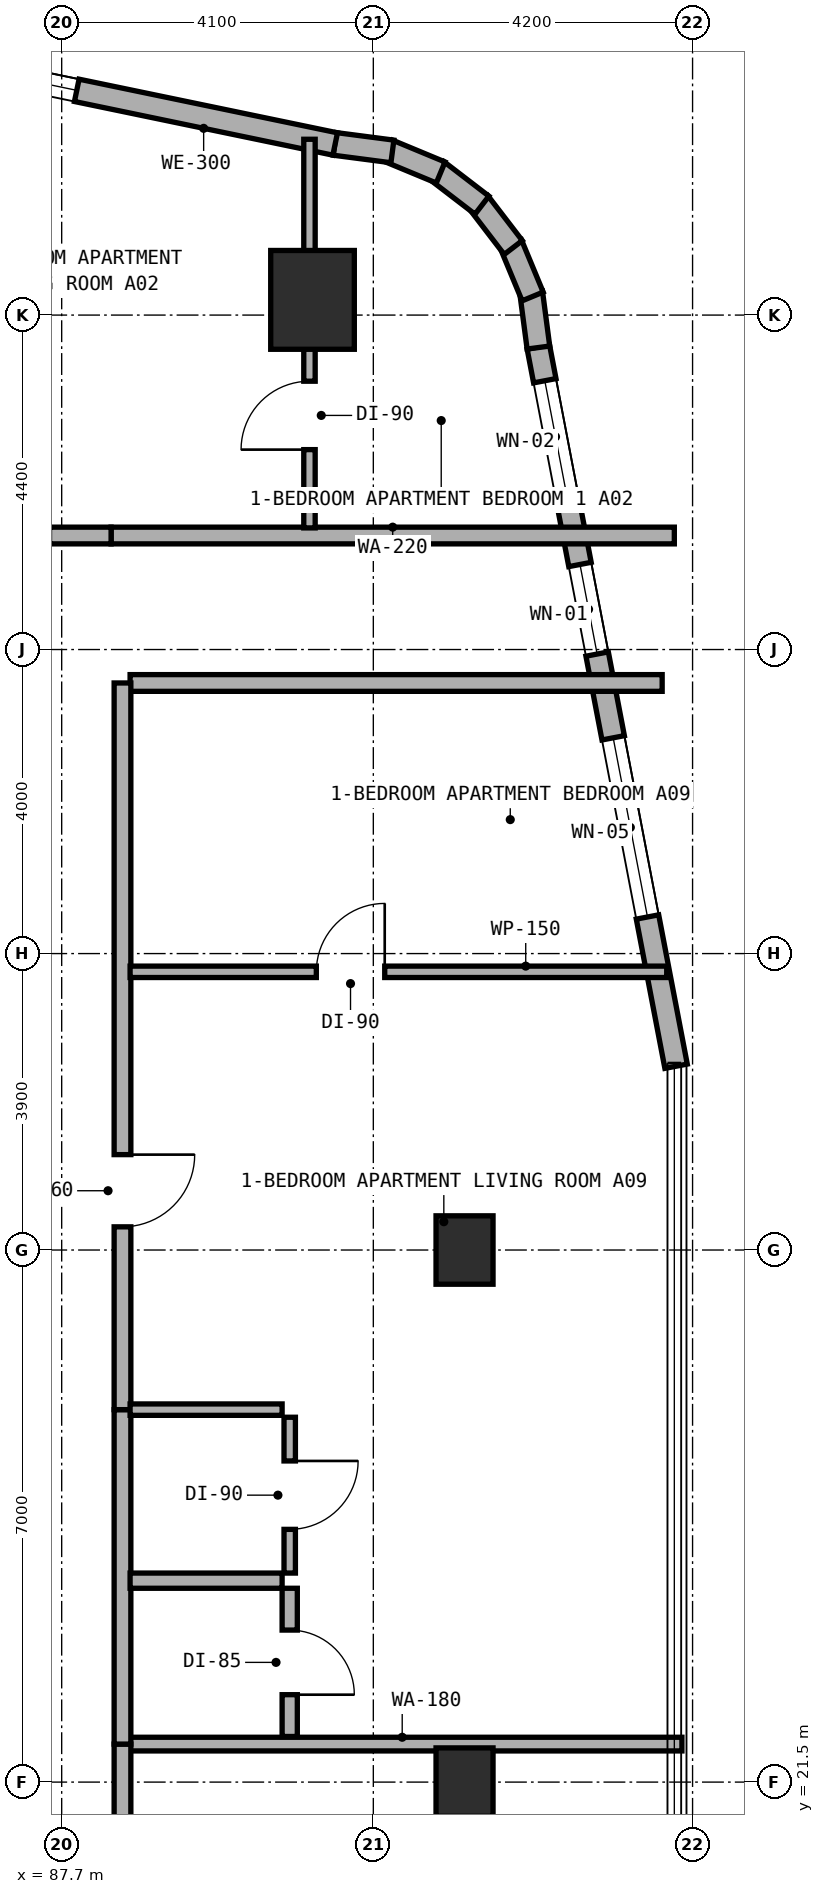
"""IFC4 building model, lengths in metres.
Left out: names, types, materials, properties, quantities, classifications, styles, units other than length and angle.
Written with IfcOpenShell. Run it as: python <this file> out.ifc"""

import sys

from ifc_helpers import new_model, si_unit, direction, frame, frame_2d, origin, origin_2d, place, context, subcontext, project, spatial, rectangle, extrude, element, fill, save


model = new_model("IFC4")
c1 = context("Model", 3, precision=1e-05, world=origin(), true_north=direction((0.0, 1.0)))
c2 = subcontext(c1, "Body", "Model", "MODEL_VIEW")
j1 = project(units=[si_unit("LENGTHUNIT", "METRE"), si_unit("PLANEANGLEUNIT", "RADIAN")], contexts=[c1])
p1 = place(None, origin())
s1 = spatial("IfcSite", under=j1, at=p1, CompositionType="ELEMENT")
p2 = place(p1, origin())
s2 = spatial("IfcBuilding", under=s1, at=p2, CompositionType="ELEMENT")
p3 = place(p2, frame((0.0, 0.0, 41.5)))
s3 = spatial("IfcBuildingStorey", under=s2, at=p3, CompositionType="ELEMENT", Elevation=41.5)
for number, where, z_axis, x_axis in (
    (1, (93.0, 21.5, 0.0), (0.0, 0.0, 1.0), (1.0, 0.0, 0.0)),
    (2, (93.0, 28.5, 0.0), (0.0, 0.0, 1.0), (1.0, 0.0, 0.0)),
):
    element("IfcColumn", number, at=place(p3, frame(where, z_axis=z_axis, x_axis=x_axis)), inside=s3, PredefinedType="COLUMN", context=c2, shape_type="SweptSolid", body=[
        extrude(rectangle(XDim=0.75, YDim=0.9, at=origin_2d()), origin(), (0.0, 0.0, 1.0), 3.5),
    ])
p4 = place(p3, frame((91.0, 41.0, 0.0), z_axis=(0.0, 0.0, 1.0), x_axis=(1.0, 0.0, 0.0)))
e3 = element("IfcColumn", 3, at=p4, inside=s3, PredefinedType="COLUMN", context=c2, shape_type="SweptSolid", body=[
    extrude(rectangle(XDim=1.1, YDim=1.3, at=origin_2d()), origin(), (0.0, 0.0, 1.0), 3.5),
])
p5 = place(p3, frame((95.783, 30.918, 0.0), z_axis=(0.0, 0.0, 1.0), x_axis=(-0.188087874316, 0.982152203854, 0.0)))
e4 = element("IfcWall", 4, at=p5, inside=s3, PredefinedType="STANDARD", context=c2, shape_type="SweptSolid", body=[
    extrude(rectangle(XDim=9.634, YDim=0.3, at=frame_2d((4.817, 0.0))), origin(), (0.0, 0.0, 1.0), 3.25),
])
p6 = place(p5, frame((1.999, 0.0, 0.8)))
e5 = element("IfcOpeningElement", 5, at=p6, cuts=e4, PredefinedType="OPENING", context=c2, shape_type="SweptSolid", body=[
    extrude(rectangle(XDim=2.4, YDim=1.6, at=frame_2d((1.2, 0.8))), frame((0.0, 0.16, 0.0), z_axis=(0.0, -1.0, 0.0), x_axis=(1.0, 0.0, 0.0)), (0.0, 0.0, 1.0), 0.32),
])
p7 = place(p5, frame((5.521, 0.0, 0.85)))
e6 = element("IfcOpeningElement", 6, at=p7, cuts=e4, PredefinedType="OPENING", context=c2, shape_type="SweptSolid", body=[
    extrude(rectangle(XDim=1.2, YDim=1.5, at=frame_2d((0.6, 0.75))), frame((0.0, 0.16, 0.0), z_axis=(0.0, -1.0, 0.0), x_axis=(1.0, 0.0, 0.0)), (0.0, 0.0, 1.0), 0.32),
])
p8 = place(p5, frame((7.682, 0.0, 0.85)))
e7 = element("IfcOpeningElement", 7, at=p8, cuts=e4, PredefinedType="OPENING", context=c2, shape_type="SweptSolid", body=[
    extrude(rectangle(XDim=1.5, YDim=1.5, at=frame_2d((0.75, 0.75))), frame((0.0, 0.16, 0.0), z_axis=(0.0, -1.0, 0.0), x_axis=(1.0, 0.0, 0.0)), (0.0, 0.0, 1.0), 0.32),
])
p9 = place(p3, frame((93.972, 40.373, 0.0), z_axis=(0.0, 0.0, 1.0), x_axis=(-0.130255288807, 0.991480488834, 0.0)))
e8 = element("IfcWall", 8, at=p9, inside=s3, PredefinedType="STANDARD", context=c2, shape_type="SweptSolid", body=[
    extrude(rectangle(XDim=0.729, YDim=0.3, at=frame_2d((0.365, 0.0))), origin(), (0.0, 0.0, 1.0), 3.25),
])
p10 = place(p3, frame((93.896, 41.045, 0.0), z_axis=(0.0, 0.0, 1.0), x_axis=(-0.383267045233, 0.923637576129, 0.0)))
e9 = element("IfcWall", 9, at=p10, inside=s3, PredefinedType="STANDARD", context=c2, shape_type="SweptSolid", body=[
    extrude(rectangle(XDim=0.746, YDim=0.3, at=frame_2d((0.373, 0.0))), origin(), (0.0, 0.0, 1.0), 3.25),
])
for number, where, z_axis, x_axis in (
    (10, (93.641, 41.689, 0.0), (0.0, 0.0, 1.0), (-0.609, 0.793, 0.0)),
    (11, (93.229, 42.246, 0.0), (0.0, 0.0, 1.0), (-0.794, 0.608, 0.0)),
):
    element("IfcWall", number, at=place(p3, frame(where, z_axis=z_axis, x_axis=x_axis)), inside=s3, PredefinedType="STANDARD", context=c2, shape_type="SweptSolid", body=[
        extrude(rectangle(XDim=0.746, YDim=0.3, at=frame_2d((0.373, 0.0))), origin(), (0.0, 0.0, 1.0), 3.25),
    ])
p11 = place(p3, frame((92.686, 42.676, 0.0), z_axis=(0.0, 0.0, 1.0), x_axis=(-0.923637576129, 0.383267045233, 0.0)))
e12 = element("IfcWall", 12, at=p11, inside=s3, PredefinedType="STANDARD", context=c2, shape_type="SweptSolid", body=[
    extrude(rectangle(XDim=0.746, YDim=0.3, at=frame_2d((0.373, 0.0))), origin(), (0.0, 0.0, 1.0), 3.25),
])
p12 = place(p3, frame((92.051, 42.953, 0.0), z_axis=(0.0, 0.0, 1.0), x_axis=(-0.991559404866, 0.129653178221, 0.0)))
e13 = element("IfcWall", 13, at=p12, inside=s3, PredefinedType="STANDARD", context=c2, shape_type="SweptSolid", body=[
    extrude(rectangle(XDim=0.764, YDim=0.3, at=frame_2d((0.382, 0.0))), origin(), (0.0, 0.0, 1.0), 3.25),
])
p13 = place(p3, frame((91.298, 43.051, 0.0), z_axis=(0.0, 0.0, 1.0), x_axis=(-0.979128391325, 0.203242695569, 0.0)))
e14 = element("IfcWall", 14, at=p13, inside=s3, PredefinedType="STANDARD", context=c2, shape_type="SweptSolid", body=[
    extrude(rectangle(XDim=8.92, YDim=0.3, at=frame_2d((4.46, 0.0))), origin(), (0.0, 0.0, 1.0), 3.25),
])
p14 = place(p13, frame((3.472, 0.0, 0.8)))
e15 = element("IfcOpeningElement", 15, at=p14, cuts=e14, PredefinedType="OPENING", context=c2, shape_type="SweptSolid", body=[
    extrude(rectangle(XDim=2.4, YDim=1.6, at=frame_2d((1.2, 0.8))), frame((0.0, 0.16, 0.0), z_axis=(0.0, -1.0, 0.0), x_axis=(1.0, 0.0, 0.0)), (0.0, 0.0, 1.0), 0.32),
])
p15 = place(p3, frame((88.35, 37.9, 0.0), z_axis=(0.0, 0.0, 1.0), x_axis=(1.0, 0.0, 0.0)))
e16 = element("IfcWall", 16, at=p15, inside=s3, PredefinedType="SOLIDWALL", context=c2, shape_type="SweptSolid", body=[
    extrude(rectangle(XDim=7.41, YDim=0.22, at=frame_2d((3.705, 0.0))), origin(), (0.0, 0.0, 1.0), 2.865),
])
p16 = place(p3, frame((85.78, 37.9, 0.0), z_axis=(0.0, 0.0, 1.0), x_axis=(1.0, 0.0, 0.0)))
e17 = element("IfcWall", 17, at=p16, inside=s3, PredefinedType="SOLIDWALL", context=c2, shape_type="SweptSolid", body=[
    extrude(rectangle(XDim=2.57, YDim=0.22, at=frame_2d((1.285, 0.0))), origin(), (0.0, 0.0, 1.0), 3.22),
])
p17 = place(p16, frame((0.81, 0.0, 0.0)))
e18 = element("IfcOpeningElement", 18, at=p17, cuts=e17, PredefinedType="OPENING", context=c2, shape_type="SweptSolid", body=[
    extrude(rectangle(XDim=0.95, YDim=2.1, at=frame_2d((0.475, 1.05))), frame((0.0, 0.12, 0.0), z_axis=(0.0, -1.0, 0.0), x_axis=(1.0, 0.0, 0.0)), (0.0, 0.0, 1.0), 0.24),
])
p18 = place(p3, frame((90.96, 38.0, 0.0), z_axis=(0.0, 0.0, 1.0), x_axis=(0.0, 1.0, 0.0)))
e19 = element("IfcWall", 19, at=p18, inside=s3, PredefinedType="PARTITIONING", context=c2, shape_type="SweptSolid", body=[
    extrude(rectangle(XDim=5.113, YDim=0.15, at=frame_2d((2.557, 0.0))), origin(), (0.0, 0.0, 1.0), 2.865),
])
p19 = place(p18, frame((1.03, 0.0, 0.0)))
e20 = element("IfcOpeningElement", 20, at=p19, cuts=e19, PredefinedType="OPENING", context=c2, shape_type="SweptSolid", body=[
    extrude(rectangle(XDim=0.9, YDim=2.1, at=frame_2d((0.45, 1.05))), frame((0.0, 0.085, 0.0), z_axis=(0.0, -1.0, 0.0), x_axis=(1.0, 0.0, 0.0)), (0.0, 0.0, 1.0), 0.17),
])
p20 = place(p3, frame((88.6, 35.96, 0.0), z_axis=(0.0, 0.0, 1.0), x_axis=(1.0, 0.0, 0.0)))
e21 = element("IfcWall", 21, at=p20, inside=s3, PredefinedType="SOLIDWALL", context=c2, shape_type="SweptSolid", body=[
    extrude(rectangle(XDim=7.0, YDim=0.22, at=frame_2d((3.5, 0.0))), origin(), (0.0, 0.0, 1.0), 2.865),
])
p21 = place(p3, frame((88.5, 22.0, 0.0), z_axis=(0.0, 0.0, 1.0), x_axis=(1.0, 0.0, 0.0)))
e22 = element("IfcWall", 22, at=p21, inside=s3, PredefinedType="SOLIDWALL", context=c2, shape_type="SweptSolid", body=[
    extrude(rectangle(XDim=7.36, YDim=0.18, at=frame_2d((3.68, 0.0))), origin(), (0.0, 0.0, 1.0), 2.865),
])
p22 = place(p3, frame((88.5, 18.44, 0.0), z_axis=(0.0, 0.0, 1.0), x_axis=(0.0, 1.0, 0.0)))
e23 = element("IfcWall", 23, at=p22, inside=s3, PredefinedType="SOLIDWALL", context=c2, shape_type="SweptSolid", body=[
    extrude(rectangle(XDim=3.56, YDim=0.22, at=frame_2d((1.78, 0.0))), origin(), (0.0, 0.0, 1.0), 2.725),
])
p23 = place(p22, frame((1.305, 0.0, 0.0)))
e24 = element("IfcOpeningElement", 24, at=p23, cuts=e23, PredefinedType="OPENING", context=c2, shape_type="SweptSolid", body=[
    extrude(rectangle(XDim=0.95, YDim=2.1, at=frame_2d((0.475, 1.05))), frame((0.0, 0.12, 0.0), z_axis=(0.0, -1.0, 0.0), x_axis=(1.0, 0.0, 0.0)), (0.0, 0.0, 1.0), 0.24),
])
p24 = place(p3, frame((88.5, 22.0, 0.0), z_axis=(0.0, 0.0, 1.0), x_axis=(0.0, 1.0, 0.0)))
e25 = element("IfcWall", 25, at=p24, inside=s3, PredefinedType="SOLIDWALL", context=c2, shape_type="SweptSolid", body=[
    extrude(rectangle(XDim=4.4, YDim=0.22, at=frame_2d((2.2, 0.0))), origin(), (0.0, 0.0, 1.0), 3.22),
])
p25 = place(p3, frame((88.5, 26.4, 0.0), z_axis=(0.0, 0.0, 1.0), x_axis=(0.0, 1.0, 0.0)))
e26 = element("IfcWall", 26, at=p25, inside=s3, PredefinedType="SOLIDWALL", context=c2, shape_type="SweptSolid", body=[
    extrude(rectangle(XDim=9.56, YDim=0.22, at=frame_2d((4.78, 0.0))), origin(), (0.0, 0.0, 1.0), 2.725),
])
p26 = place(p25, frame((2.405, 0.0, 0.0)))
e27 = element("IfcOpeningElement", 27, at=p26, cuts=e26, PredefinedType="OPENING", context=c2, shape_type="SweptSolid", body=[
    extrude(rectangle(XDim=0.95, YDim=2.1, at=frame_2d((0.475, 1.05))), frame((0.0, 0.12, 0.0), z_axis=(0.0, -1.0, 0.0), x_axis=(1.0, 0.0, 0.0)), (0.0, 0.0, 1.0), 0.24),
])
p27 = place(p3, frame((88.6, 32.16, 0.0), z_axis=(0.0, 0.0, 1.0), x_axis=(1.0, 0.0, 0.0)))
e28 = element("IfcWall", 28, at=p27, inside=s3, PredefinedType="PARTITIONING", context=c2, shape_type="SweptSolid", body=[
    extrude(rectangle(XDim=7.06, YDim=0.15, at=frame_2d((3.53, 0.0))), origin(), (0.0, 0.0, 1.0), 2.865),
])
p28 = place(p27, frame((2.45, 0.0, 0.0)))
e29 = element("IfcOpeningElement", 29, at=p28, cuts=e28, PredefinedType="OPENING", context=c2, shape_type="SweptSolid", body=[
    extrude(rectangle(XDim=0.9, YDim=2.1, at=frame_2d((0.45, 1.05))), frame((0.0, 0.085, 0.0), z_axis=(0.0, -1.0, 0.0), x_axis=(1.0, 0.0, 0.0)), (0.0, 0.0, 1.0), 0.17),
])
p29 = place(p3, frame((88.6, 24.15, 0.0), z_axis=(0.0, 0.0, 1.0), x_axis=(1.0, 0.0, 0.0)))
e30 = element("IfcWall", 30, at=p29, inside=s3, PredefinedType="PLUMBINGWALL", context=c2, shape_type="SweptSolid", body=[
    extrude(rectangle(XDim=2.0, YDim=0.2, at=frame_2d((1.0, 0.0))), origin(), (0.0, 0.0, 1.0), 3.22),
])
p30 = place(p3, frame((88.6, 26.4, 0.0), z_axis=(0.0, 0.0, 1.0), x_axis=(1.0, 0.0, 0.0)))
e31 = element("IfcWall", 31, at=p30, inside=s3, PredefinedType="PARTITIONING", context=c2, shape_type="SweptSolid", body=[
    extrude(rectangle(XDim=2.0, YDim=0.15, at=frame_2d((1.0, 0.0))), origin(), (0.0, 0.0, 1.0), 3.22),
])
p31 = place(p3, frame((90.7, 22.1, 0.0), z_axis=(0.0, 0.0, 1.0), x_axis=(0.0, 1.0, 0.0)))
e32 = element("IfcWall", 32, at=p31, inside=s3, PredefinedType="PLUMBINGWALL", context=c2, shape_type="SweptSolid", body=[
    extrude(rectangle(XDim=1.95, YDim=0.2, at=frame_2d((0.975, 0.0))), origin(), (0.0, 0.0, 1.0), 3.22),
])
p32 = place(p31, frame((0.55, 0.0, 0.0)))
e33 = element("IfcOpeningElement", 33, at=p32, cuts=e32, PredefinedType="OPENING", context=c2, shape_type="SweptSolid", body=[
    extrude(rectangle(XDim=0.85, YDim=2.1, at=frame_2d((0.425, 1.05))), frame((0.0, 0.11, 0.0), z_axis=(0.0, -1.0, 0.0), x_axis=(1.0, 0.0, 0.0)), (0.0, 0.0, 1.0), 0.22),
])
p33 = place(p3, frame((90.7, 24.25, 0.0), z_axis=(0.0, 0.0, 1.0), x_axis=(0.0, 1.0, 0.0)))
e34 = element("IfcWall", 34, at=p33, inside=s3, PredefinedType="PARTITIONING", context=c2, shape_type="SweptSolid", body=[
    extrude(rectangle(XDim=2.05, YDim=0.15, at=frame_2d((1.025, 0.0))), origin(), (0.0, 0.0, 1.0), 3.22),
])
p34 = place(p33, frame((0.575, 0.0, 0.0)))
e35 = element("IfcOpeningElement", 35, at=p34, cuts=e34, PredefinedType="OPENING", context=c2, shape_type="SweptSolid", body=[
    extrude(rectangle(XDim=0.9, YDim=2.1, at=frame_2d((0.45, 1.05))), frame((0.0, 0.085, 0.0), z_axis=(0.0, -1.0, 0.0), x_axis=(1.0, 0.0, 0.0)), (0.0, 0.0, 1.0), 0.17),
])
p35 = place(p6, origin())
e36 = element("IfcWindow", 36, at=p35, inside=s3, PartitioningType="SINGLE_PANEL", PredefinedType="WINDOW", context=c2, shape_type="SweptSolid", body=[
    extrude(rectangle(XDim=2.4, YDim=1.6, at=frame_2d((1.2, 0.8))), frame((0.0, 0.03, 0.0), z_axis=(0.0, -1.0, 0.0), x_axis=(1.0, 0.0, 0.0)), (0.0, 0.0, 1.0), 0.06),
])
fill(e5, e36)
p36 = place(p7, origin())
e37 = element("IfcWindow", 37, at=p36, inside=s3, PartitioningType="SINGLE_PANEL", PredefinedType="WINDOW", context=c2, shape_type="SweptSolid", body=[
    extrude(rectangle(XDim=1.2, YDim=1.5, at=frame_2d((0.6, 0.75))), frame((0.0, 0.03, 0.0), z_axis=(0.0, -1.0, 0.0), x_axis=(1.0, 0.0, 0.0)), (0.0, 0.0, 1.0), 0.06),
])
fill(e6, e37)
p37 = place(p8, origin())
e38 = element("IfcWindow", 38, at=p37, inside=s3, PartitioningType="SINGLE_PANEL", PredefinedType="WINDOW", context=c2, shape_type="SweptSolid", body=[
    extrude(rectangle(XDim=1.5, YDim=1.5, at=frame_2d((0.75, 0.75))), frame((0.0, 0.03, 0.0), z_axis=(0.0, -1.0, 0.0), x_axis=(1.0, 0.0, 0.0)), (0.0, 0.0, 1.0), 0.06),
])
fill(e7, e38)
p38 = place(p14, origin())
e39 = element("IfcWindow", 39, at=p38, inside=s3, PartitioningType="SINGLE_PANEL", PredefinedType="WINDOW", context=c2, shape_type="SweptSolid", body=[
    extrude(rectangle(XDim=2.4, YDim=1.6, at=frame_2d((1.2, 0.8))), frame((0.0, 0.03, 0.0), z_axis=(0.0, -1.0, 0.0), x_axis=(1.0, 0.0, 0.0)), (0.0, 0.0, 1.0), 0.06),
])
fill(e15, e39)
p39 = place(p19, origin())
e40 = element("IfcDoor", 40, at=p39, inside=s3, OperationType="SINGLE_SWING_LEFT", PredefinedType="DOOR", context=c2, shape_type="SweptSolid", body=[
    extrude(rectangle(XDim=0.9, YDim=2.1, at=frame_2d((0.45, 1.05))), frame((0.0, 0.025, 0.0), z_axis=(0.0, -1.0, 0.0), x_axis=(1.0, 0.0, 0.0)), (0.0, 0.0, 1.0), 0.05),
])
fill(e20, e40)
p40 = place(p26, frame((0.95, 0.0, 0.0), z_axis=(0.0, 0.0, 1.0), x_axis=(-1.0, 0.0, 0.0)))
e41 = element("IfcDoor", 41, at=p40, inside=s3, OperationType="SINGLE_SWING_LEFT", PredefinedType="DOOR", context=c2, shape_type="SweptSolid", body=[
    extrude(rectangle(XDim=0.95, YDim=2.1, at=frame_2d((0.475, 1.05))), frame((0.0, 0.025, 0.0), z_axis=(0.0, -1.0, 0.0), x_axis=(1.0, 0.0, 0.0)), (0.0, 0.0, 1.0), 0.05),
])
fill(e27, e41)
p41 = place(p28, origin())
e42 = element("IfcDoor", 42, at=p41, inside=s3, OperationType="SINGLE_SWING_RIGHT", PredefinedType="DOOR", context=c2, shape_type="SweptSolid", body=[
    extrude(rectangle(XDim=0.9, YDim=2.1, at=frame_2d((0.45, 1.05))), frame((0.0, 0.025, 0.0), z_axis=(0.0, -1.0, 0.0), x_axis=(1.0, 0.0, 0.0)), (0.0, 0.0, 1.0), 0.05),
])
fill(e29, e42)
p42 = place(p32, frame((0.85, 0.0, 0.0), z_axis=(0.0, 0.0, 1.0), x_axis=(-1.0, 0.0, 0.0)))
e43 = element("IfcDoor", 43, at=p42, inside=s3, OperationType="SINGLE_SWING_RIGHT", PredefinedType="DOOR", context=c2, shape_type="SweptSolid", body=[
    extrude(rectangle(XDim=0.85, YDim=2.1, at=frame_2d((0.425, 1.05))), frame((0.0, 0.025, 0.0), z_axis=(0.0, -1.0, 0.0), x_axis=(1.0, 0.0, 0.0)), (0.0, 0.0, 1.0), 0.05),
])
fill(e33, e43)
p43 = place(p34, frame((0.9, 0.0, 0.0), z_axis=(0.0, 0.0, 1.0), x_axis=(-1.0, 0.0, 0.0)))
e44 = element("IfcDoor", 44, at=p43, inside=s3, OperationType="SINGLE_SWING_LEFT", PredefinedType="DOOR", context=c2, shape_type="SweptSolid", body=[
    extrude(rectangle(XDim=0.9, YDim=2.1, at=frame_2d((0.45, 1.05))), frame((0.0, 0.025, 0.0), z_axis=(0.0, -1.0, 0.0), x_axis=(1.0, 0.0, 0.0)), (0.0, 0.0, 1.0), 0.05),
])
fill(e35, e44)
save(model, sys.argv[1])
